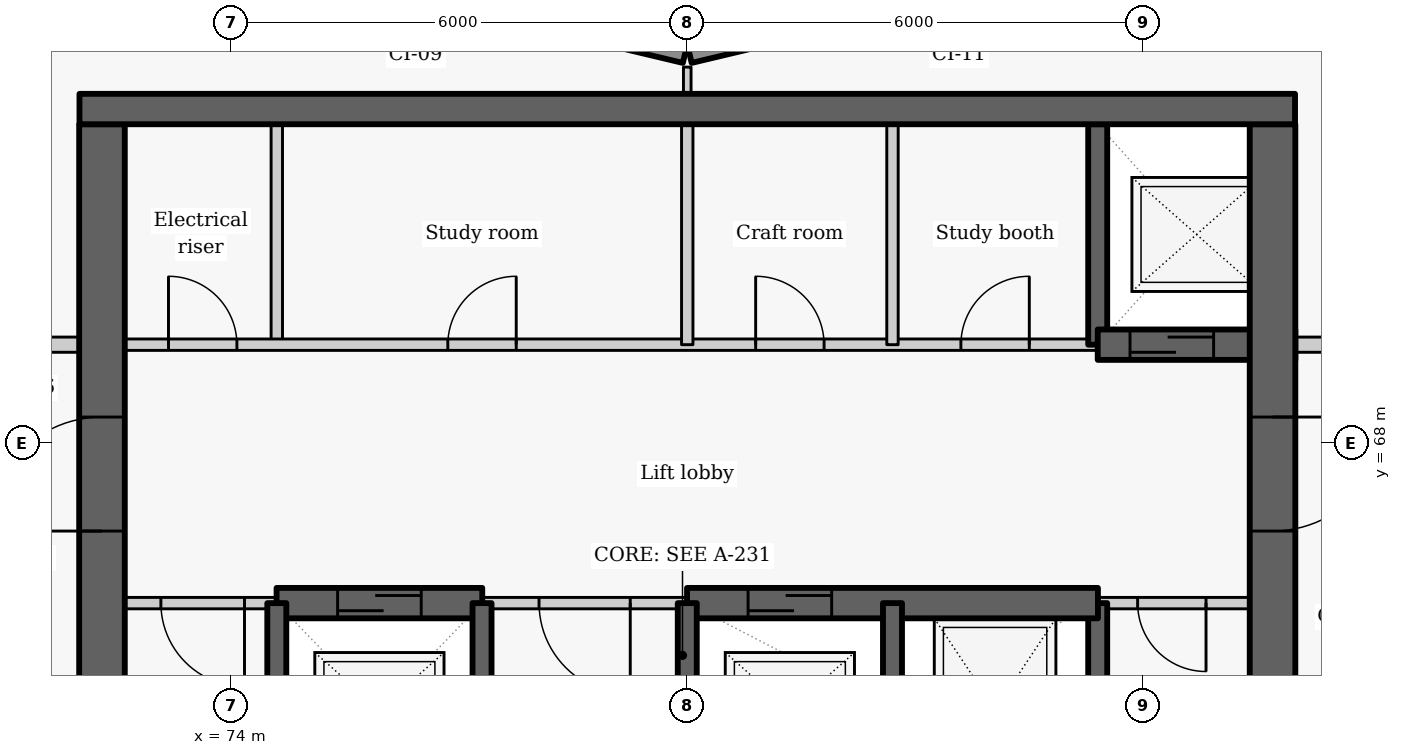
"""IFC4 building model, lengths in metres.
Left out: names, types, materials, properties, quantities, classifications, styles, units other than length and angle.
Written with IfcOpenShell. Run it as: python <this file> out.ifc"""

import sys

from ifc_helpers import new_model, si_unit, direction, frame, frame_2d, origin, place, context, subcontext, project, spatial, rectangle, extrude, element, fill, save


model = new_model("IFC4")
c1 = context("Model", 3, precision=1e-05, world=origin(), true_north=direction((0.0, 1.0)))
c2 = subcontext(c1, "Body", "Model", "MODEL_VIEW")
j1 = project(units=[si_unit("LENGTHUNIT", "METRE"), si_unit("PLANEANGLEUNIT", "RADIAN")], contexts=[c1])
p1 = place(None, origin())
s1 = spatial("IfcSite", under=j1, at=p1, CompositionType="ELEMENT")
p2 = place(p1, origin())
s2 = spatial("IfcBuilding", under=s1, at=p2, CompositionType="ELEMENT")
p3 = place(p2, frame((0.0, 0.0, 176.7)))
s3 = spatial("IfcBuildingStorey", under=s2, at=p3, CompositionType="ELEMENT", Elevation=176.7)
p4 = place(p3, frame((83.186, 73.881, 0.0), z_axis=(0.0, 0.0, 1.0), x_axis=(-0.972773113459, -0.231759508395, 0.0)))
e1 = element("IfcWall", 1, at=p4, inside=s3, PredefinedType="SOLIDWALL", context=c2, shape_type="SweptSolid", body=[
    extrude(rectangle(XDim=3.246, YDim=0.25, at=frame_2d((1.623, 0.0))), origin(), (0.0, 0.0, 1.0), 2.425),
])
p5 = place(p4, frame((0.573, 0.0, 0.9)))
e2 = element("IfcOpeningElement", 2, at=p5, cuts=e1, PredefinedType="OPENING", context=c2, shape_type="SweptSolid", body=[
    extrude(rectangle(XDim=2.1, YDim=1.1, at=frame_2d((1.05, 0.55))), frame((0.0, 0.135, 0.0), z_axis=(0.0, -1.0, 0.0), x_axis=(1.0, 0.0, 0.0)), (0.0, 0.0, 1.0), 0.27),
])
p6 = place(p3, frame((79.971, 73.128, 0.0), z_axis=(0.0, 0.0, 1.0), x_axis=(-0.972773113459, 0.231759508395, 0.0)))
e3 = element("IfcWall", 3, at=p6, inside=s3, PredefinedType="SOLIDWALL", context=c2, shape_type="SweptSolid", body=[
    extrude(rectangle(XDim=3.246, YDim=0.25, at=frame_2d((1.623, 0.0))), origin(), (0.0, 0.0, 1.0), 2.425),
])
p7 = place(p6, frame((0.573, 0.0, 0.9)))
e4 = element("IfcOpeningElement", 4, at=p7, cuts=e3, PredefinedType="OPENING", context=c2, shape_type="SweptSolid", body=[
    extrude(rectangle(XDim=2.1, YDim=1.1, at=frame_2d((1.05, 0.55))), frame((0.0, 0.135, 0.0), z_axis=(0.0, -1.0, 0.0), x_axis=(1.0, 0.0, 0.0)), (0.0, 0.0, 1.0), 0.27),
])
p8 = place(p3, frame((74.6, 69.3, 0.0), z_axis=(0.0, 0.0, 1.0), x_axis=(0.0, 1.0, 0.0)))
e5 = element("IfcWall", 5, at=p8, inside=s3, PredefinedType="PARTITIONING", context=c2, shape_type="SweptSolid", body=[
    extrude(rectangle(XDim=2.9, YDim=0.15, at=frame_2d((1.45, 0.0))), origin(), (0.0, 0.0, 1.0), 3.025),
])
p9 = place(p3, frame((72.0, 69.3, 0.0), z_axis=(0.0, 0.0, 1.0), x_axis=(1.0, 0.0, 0.0)))
e6 = element("IfcWall", 6, at=p9, inside=s3, PredefinedType="PARTITIONING", context=c2, shape_type="SweptSolid", body=[
    extrude(rectangle(XDim=13.4, YDim=0.15, at=frame_2d((6.7, 0.0))), origin(), (0.0, 0.0, 1.0), 3.025),
])
p10 = place(p9, frame((1.175, 0.0, 0.0)))
e7 = element("IfcOpeningElement", 7, at=p10, cuts=e6, PredefinedType="OPENING", context=c2, shape_type="SweptSolid", body=[
    extrude(rectangle(XDim=0.9, YDim=2.1, at=frame_2d((0.45, 1.05))), frame((0.0, 0.085, 0.0), z_axis=(0.0, -1.0, 0.0), x_axis=(1.0, 0.0, 0.0)), (0.0, 0.0, 1.0), 0.17),
])
p11 = place(p9, frame((4.85, 0.0, 0.0)))
e8 = element("IfcOpeningElement", 8, at=p11, cuts=e6, PredefinedType="OPENING", context=c2, shape_type="SweptSolid", body=[
    extrude(rectangle(XDim=0.9, YDim=2.1, at=frame_2d((0.45, 1.05))), frame((0.0, 0.085, 0.0), z_axis=(0.0, -1.0, 0.0), x_axis=(1.0, 0.0, 0.0)), (0.0, 0.0, 1.0), 0.17),
])
p12 = place(p9, frame((8.9, 0.0, 0.0)))
e9 = element("IfcOpeningElement", 9, at=p12, cuts=e6, PredefinedType="OPENING", context=c2, shape_type="SweptSolid", body=[
    extrude(rectangle(XDim=0.9, YDim=2.1, at=frame_2d((0.45, 1.05))), frame((0.0, 0.085, 0.0), z_axis=(0.0, -1.0, 0.0), x_axis=(1.0, 0.0, 0.0)), (0.0, 0.0, 1.0), 0.17),
])
p13 = place(p9, frame((11.6, 0.0, 0.0)))
e10 = element("IfcOpeningElement", 10, at=p13, cuts=e6, PredefinedType="OPENING", context=c2, shape_type="SweptSolid", body=[
    extrude(rectangle(XDim=0.9, YDim=2.1, at=frame_2d((0.45, 1.05))), frame((0.0, 0.085, 0.0), z_axis=(0.0, -1.0, 0.0), x_axis=(1.0, 0.0, 0.0)), (0.0, 0.0, 1.0), 0.17),
])
p14 = place(p3, frame((72.3, 63.1, -0.41), z_axis=(0.0, 0.0, 1.0), x_axis=(0.0, 1.0, 0.0)))
e11 = element("IfcWall", 11, at=p14, inside=s3, PredefinedType="SHEAR", context=c2, shape_type="SweptSolid", body=[
    extrude(rectangle(XDim=9.1, YDim=0.6, at=frame_2d((4.55, 0.0))), origin(), (0.0, 0.0, 1.0), 3.435),
])
p15 = place(p14, frame((3.748, 0.0, 0.41)))
e12 = element("IfcOpeningElement", 12, at=p15, cuts=e11, PredefinedType="OPENING", context=c2, shape_type="SweptSolid", body=[
    extrude(rectangle(XDim=1.5, YDim=2.1, at=frame_2d((0.75, 1.05))), frame((0.0, 0.31, 0.0), z_axis=(0.0, -1.0, 0.0), x_axis=(1.0, 0.0, 0.0)), (0.0, 0.0, 1.0), 0.62),
])
p16 = place(p3, frame((85.4, 63.1, -0.41), z_axis=(0.0, 0.0, 1.0), x_axis=(0.0, 1.0, 0.0)))
e13 = element("IfcWall", 13, at=p16, inside=s3, PredefinedType="SHEAR", context=c2, shape_type="SweptSolid", body=[
    extrude(rectangle(XDim=2.8, YDim=0.25, at=frame_2d((1.4, 0.0))), origin(), (0.0, 0.0, 1.0), 3.435),
])
p17 = place(p3, frame((85.4, 69.3, -0.41), z_axis=(0.0, 0.0, 1.0), x_axis=(0.0, 1.0, 0.0)))
e14 = element("IfcWall", 14, at=p17, inside=s3, PredefinedType="SHEAR", context=c2, shape_type="SweptSolid", body=[
    extrude(rectangle(XDim=2.9, YDim=0.25, at=frame_2d((1.45, 0.0))), origin(), (0.0, 0.0, 1.0), 3.435),
])
p18 = place(p3, frame((85.4, 69.3, -0.41), z_axis=(0.0, 0.0, 1.0), x_axis=(1.0, 0.0, 0.0)))
e15 = element("IfcWall", 15, at=p18, inside=s3, PredefinedType="SHEAR", context=c2, shape_type="SweptSolid", body=[
    extrude(rectangle(XDim=2.6, YDim=0.4, at=frame_2d((1.3, 0.0))), origin(), (0.0, 0.0, 1.0), 3.435),
])
p19 = place(p18, frame((0.425, 0.0, 0.41)))
e16 = element("IfcOpeningElement", 16, at=p19, cuts=e15, PredefinedType="OPENING", context=c2, shape_type="SweptSolid", body=[
    extrude(rectangle(XDim=1.1, YDim=2.1, at=frame_2d((0.55, 1.05))), frame((0.0, 0.21, 0.0), z_axis=(0.0, -1.0, 0.0), x_axis=(1.0, 0.0, 0.0)), (0.0, 0.0, 1.0), 0.42),
])
p20 = place(p3, frame((87.7, 72.2, -0.41), z_axis=(0.0, 0.0, 1.0), x_axis=(0.0, -1.0, 0.0)))
e17 = element("IfcWall", 17, at=p20, inside=s3, PredefinedType="SHEAR", context=c2, shape_type="SweptSolid", body=[
    extrude(rectangle(XDim=14.25, YDim=0.6, at=frame_2d((7.125, 0.0))), origin(), (0.0, 0.0, 1.0), 3.435),
])
p21 = place(p20, frame((3.852, 0.0, 0.41)))
e18 = element("IfcOpeningElement", 18, at=p21, cuts=e17, PredefinedType="OPENING", context=c2, shape_type="SweptSolid", body=[
    extrude(rectangle(XDim=1.5, YDim=2.1, at=frame_2d((0.75, 1.05))), frame((0.0, 0.31, 0.0), z_axis=(0.0, -1.0, 0.0), x_axis=(1.0, 0.0, 0.0)), (0.0, 0.0, 1.0), 0.62),
])
for number, where, z_axis, x_axis in (
    (19, (80.0, 69.3, 0.0), (0.0, 0.0, 1.0), (0.0, 1.0, 0.0)),
    (20, (82.7, 69.3, 0.0), (0.0, 0.0, 1.0), (0.0, 1.0, 0.0)),
):
    element("IfcWall", number, at=place(p3, frame(where, z_axis=z_axis, x_axis=x_axis)), inside=s3, PredefinedType="PARTITIONING", context=c2, shape_type="SweptSolid", body=[
        extrude(rectangle(XDim=2.9, YDim=0.15, at=frame_2d((1.45, 0.0))), origin(), (0.0, 0.0, 1.0), 3.025),
    ])
p22 = place(p3, frame((74.603, 65.9, 0.0), z_axis=(0.0, 0.0, 1.0), x_axis=(-1.0, 0.0, 0.0)))
e21 = element("IfcWall", 21, at=p22, inside=s3, PredefinedType="PARTITIONING", context=c2, shape_type="SweptSolid", body=[
    extrude(rectangle(XDim=2.603, YDim=0.15, at=frame_2d((1.302, 0.0))), origin(), (0.0, 0.0, 1.0), 3.025),
])
p23 = place(p22, frame((0.428, 0.0, 0.0)))
e22 = element("IfcOpeningElement", 22, at=p23, cuts=e21, PredefinedType="OPENING", context=c2, shape_type="SweptSolid", body=[
    extrude(rectangle(XDim=1.1, YDim=2.1, at=frame_2d((0.55, 1.05))), frame((0.0, 0.085, 0.0), z_axis=(0.0, -1.0, 0.0), x_axis=(1.0, 0.0, 0.0)), (0.0, 0.0, 1.0), 0.17),
])
p24 = place(p3, frame((80.003, 65.9, 0.0), z_axis=(0.0, 0.0, 1.0), x_axis=(-1.0, 0.0, 0.0)))
e23 = element("IfcWall", 23, at=p24, inside=s3, PredefinedType="PARTITIONING", context=c2, shape_type="SweptSolid", body=[
    extrude(rectangle(XDim=2.706, YDim=0.15, at=frame_2d((1.353, 0.0))), origin(), (0.0, 0.0, 1.0), 3.025),
])
p25 = place(p24, frame((0.753, 0.0, 0.0)))
e24 = element("IfcOpeningElement", 24, at=p25, cuts=e23, PredefinedType="OPENING", context=c2, shape_type="SweptSolid", body=[
    extrude(rectangle(XDim=1.2, YDim=2.1, at=frame_2d((0.6, 1.05))), frame((0.0, 0.085, 0.0), z_axis=(0.0, -1.0, 0.0), x_axis=(1.0, 0.0, 0.0)), (0.0, 0.0, 1.0), 0.17),
])
p26 = place(p3, frame((88.0, 65.9, 0.0), z_axis=(0.0, 0.0, 1.0), x_axis=(-1.0, 0.0, 0.0)))
e25 = element("IfcWall", 25, at=p26, inside=s3, PredefinedType="PARTITIONING", context=c2, shape_type="SweptSolid", body=[
    extrude(rectangle(XDim=2.603, YDim=0.15, at=frame_2d((1.302, 0.0))), origin(), (0.0, 0.0, 1.0), 3.025),
])
p27 = place(p26, frame((1.175, 0.0, 0.0)))
e26 = element("IfcOpeningElement", 26, at=p27, cuts=e25, PredefinedType="OPENING", context=c2, shape_type="SweptSolid", body=[
    extrude(rectangle(XDim=0.9, YDim=2.1, at=frame_2d((0.45, 1.05))), frame((0.0, 0.085, 0.0), z_axis=(0.0, -1.0, 0.0), x_axis=(1.0, 0.0, 0.0)), (0.0, 0.0, 1.0), 0.17),
])
p28 = place(p3, frame((74.597, 65.9, -0.41), z_axis=(0.0, 0.0, 1.0), x_axis=(1.0, 0.0, 0.0)))
e27 = element("IfcWall", 27, at=p28, inside=s3, PredefinedType="SHEAR", context=c2, shape_type="SweptSolid", body=[
    extrude(rectangle(XDim=2.706, YDim=0.4, at=frame_2d((1.353, 0.0))), origin(), (0.0, 0.0, 1.0), 3.435),
])
p29 = place(p28, frame((0.803, 0.0, 0.41)))
e28 = element("IfcOpeningElement", 28, at=p29, cuts=e27, PredefinedType="OPENING", context=c2, shape_type="SweptSolid", body=[
    extrude(rectangle(XDim=1.1, YDim=2.1, at=frame_2d((0.55, 1.05))), frame((0.0, 0.21, 0.0), z_axis=(0.0, -1.0, 0.0), x_axis=(1.0, 0.0, 0.0)), (0.0, 0.0, 1.0), 0.42),
])
p30 = place(p3, frame((79.997, 65.9, -0.41), z_axis=(0.0, 0.0, 1.0), x_axis=(1.0, 0.0, 0.0)))
e29 = element("IfcWall", 29, at=p30, inside=s3, PredefinedType="SHEAR", context=c2, shape_type="SweptSolid", body=[
    extrude(rectangle(XDim=5.406, YDim=0.4, at=frame_2d((2.703, 0.0))), origin(), (0.0, 0.0, 1.0), 3.435),
])
p31 = place(p30, frame((0.803, 0.0, 0.41)))
e30 = element("IfcOpeningElement", 30, at=p31, cuts=e29, PredefinedType="OPENING", context=c2, shape_type="SweptSolid", body=[
    extrude(rectangle(XDim=1.1, YDim=2.1, at=frame_2d((0.55, 1.05))), frame((0.0, 0.21, 0.0), z_axis=(0.0, -1.0, 0.0), x_axis=(1.0, 0.0, 0.0)), (0.0, 0.0, 1.0), 0.42),
])
for number, where, z_axis, x_axis in (
    (31, (74.6, 63.1, -0.41), (0.0, 0.0, 1.0), (0.0, 1.0, 0.0)),
    (32, (77.3, 63.1, -0.41), (0.0, 0.0, 1.0), (0.0, 1.0, 0.0)),
    (33, (80.0, 63.1, -0.41), (0.0, 0.0, 1.0), (0.0, 1.0, 0.0)),
    (34, (82.7, 63.1, -0.41), (0.0, 0.0, 1.0), (0.0, 1.0, 0.0)),
):
    element("IfcWall", number, at=place(p3, frame(where, z_axis=z_axis, x_axis=x_axis)), inside=s3, PredefinedType="SHEAR", context=c2, shape_type="SweptSolid", body=[
        extrude(rectangle(XDim=2.8, YDim=0.25, at=frame_2d((1.4, 0.0))), origin(), (0.0, 0.0, 1.0), 3.435),
    ])
for number, where, z_axis, x_axis in (
    (35, (70.45, 69.3, 0.0), (0.0, 0.0, 1.0), (1.0, 0.0, 0.0)),
    (36, (88.0, 69.3, 0.0), (0.0, 0.0, 1.0), (1.0, 0.0, 0.0)),
):
    element("IfcWall", number, at=place(p3, frame(where, z_axis=z_axis, x_axis=x_axis)), inside=s3, PredefinedType="PARTITIONING", context=c2, shape_type="SweptSolid", body=[
        extrude(rectangle(XDim=1.55, YDim=0.2, at=frame_2d((0.775, 0.0))), origin(), (0.0, 0.0, 1.0), 3.025),
    ])
p32 = place(p3, frame((80.0, 72.6, 0.0), z_axis=(0.0, 0.0, 1.0), x_axis=(0.0, 1.0, 0.0)))
e37 = element("IfcWall", 37, at=p32, inside=s3, PredefinedType="PARTITIONING", context=c2, shape_type="SweptSolid", body=[
    extrude(rectangle(XDim=0.352, YDim=0.1, at=frame_2d((0.176, 0.0))), origin(), (0.0, 0.0, 1.0), 3.025),
])
p33 = place(p3, frame((72.004, 72.4, -0.41), z_axis=(0.0, 0.0, 1.0), x_axis=(1.0, 0.0, 0.0)))
e38 = element("IfcWall", 38, at=p33, inside=s3, PredefinedType="SHEAR", context=c2, shape_type="SweptSolid", body=[
    extrude(rectangle(XDim=15.992, YDim=0.4, at=frame_2d((7.996, 0.0))), origin(), (0.0, 0.0, 1.0), 3.435),
])
p34 = place(p10, origin())
e39 = element("IfcDoor", 39, at=p34, inside=s3, OperationType="SINGLE_SWING_LEFT", PredefinedType="DOOR", context=c2, shape_type="SweptSolid", body=[
    extrude(rectangle(XDim=0.9, YDim=2.1, at=frame_2d((0.45, 1.05))), frame((0.0, 0.025, 0.0), z_axis=(0.0, -1.0, 0.0), x_axis=(1.0, 0.0, 0.0)), (0.0, 0.0, 1.0), 0.05),
])
fill(e7, e39)
p35 = place(p19, origin())
e40 = element("IfcDoor", 40, at=p35, inside=s3, OperationType="SLIDING_TO_LEFT", PredefinedType="DOOR", context=c2, shape_type="SweptSolid", body=[
    extrude(rectangle(XDim=1.1, YDim=2.1, at=frame_2d((0.55, 1.05))), frame((0.0, 0.025, 0.0), z_axis=(0.0, -1.0, 0.0), x_axis=(1.0, 0.0, 0.0)), (0.0, 0.0, 1.0), 0.05),
])
fill(e16, e40)
p36 = place(p11, origin())
e41 = element("IfcDoor", 41, at=p36, inside=s3, OperationType="SINGLE_SWING_RIGHT", PredefinedType="DOOR", context=c2, shape_type="SweptSolid", body=[
    extrude(rectangle(XDim=0.9, YDim=2.1, at=frame_2d((0.45, 1.05))), frame((0.0, 0.025, 0.0), z_axis=(0.0, -1.0, 0.0), x_axis=(1.0, 0.0, 0.0)), (0.0, 0.0, 1.0), 0.05),
])
fill(e8, e41)
p37 = place(p12, origin())
e42 = element("IfcDoor", 42, at=p37, inside=s3, OperationType="SINGLE_SWING_LEFT", PredefinedType="DOOR", context=c2, shape_type="SweptSolid", body=[
    extrude(rectangle(XDim=0.9, YDim=2.1, at=frame_2d((0.45, 1.05))), frame((0.0, 0.025, 0.0), z_axis=(0.0, -1.0, 0.0), x_axis=(1.0, 0.0, 0.0)), (0.0, 0.0, 1.0), 0.05),
])
fill(e9, e42)
p38 = place(p13, origin())
e43 = element("IfcDoor", 43, at=p38, inside=s3, OperationType="SINGLE_SWING_RIGHT", PredefinedType="DOOR", context=c2, shape_type="SweptSolid", body=[
    extrude(rectangle(XDim=0.9, YDim=2.1, at=frame_2d((0.45, 1.05))), frame((0.0, 0.025, 0.0), z_axis=(0.0, -1.0, 0.0), x_axis=(1.0, 0.0, 0.0)), (0.0, 0.0, 1.0), 0.05),
])
fill(e10, e43)
p39 = place(p23, origin())
e44 = element("IfcDoor", 44, at=p39, inside=s3, OperationType="SINGLE_SWING_LEFT", PredefinedType="DOOR", context=c2, shape_type="SweptSolid", body=[
    extrude(rectangle(XDim=1.1, YDim=2.1, at=frame_2d((0.55, 1.05))), frame((0.0, 0.025, 0.0), z_axis=(0.0, -1.0, 0.0), x_axis=(1.0, 0.0, 0.0)), (0.0, 0.0, 1.0), 0.05),
])
fill(e22, e44)
p40 = place(p29, origin())
e45 = element("IfcDoor", 45, at=p40, inside=s3, OperationType="SLIDING_TO_LEFT", PredefinedType="DOOR", context=c2, shape_type="SweptSolid", body=[
    extrude(rectangle(XDim=1.1, YDim=2.1, at=frame_2d((0.55, 1.05))), frame((0.0, 0.025, 0.0), z_axis=(0.0, -1.0, 0.0), x_axis=(1.0, 0.0, 0.0)), (0.0, 0.0, 1.0), 0.05),
])
fill(e28, e45)
p41 = place(p25, origin())
e46 = element("IfcDoor", 46, at=p41, inside=s3, OperationType="DOUBLE_DOOR_SINGLE_SWING", PredefinedType="DOOR", context=c2, shape_type="SweptSolid", body=[
    extrude(rectangle(XDim=1.2, YDim=2.1, at=frame_2d((0.6, 1.05))), frame((0.0, 0.025, 0.0), z_axis=(0.0, -1.0, 0.0), x_axis=(1.0, 0.0, 0.0)), (0.0, 0.0, 1.0), 0.05),
])
fill(e24, e46)
p42 = place(p31, origin())
e47 = element("IfcDoor", 47, at=p42, inside=s3, OperationType="SLIDING_TO_LEFT", PredefinedType="DOOR", context=c2, shape_type="SweptSolid", body=[
    extrude(rectangle(XDim=1.1, YDim=2.1, at=frame_2d((0.55, 1.05))), frame((0.0, 0.025, 0.0), z_axis=(0.0, -1.0, 0.0), x_axis=(1.0, 0.0, 0.0)), (0.0, 0.0, 1.0), 0.05),
])
fill(e30, e47)
p43 = place(p27, origin())
e48 = element("IfcDoor", 48, at=p43, inside=s3, OperationType="SINGLE_SWING_LEFT", PredefinedType="DOOR", context=c2, shape_type="SweptSolid", body=[
    extrude(rectangle(XDim=0.9, YDim=2.1, at=frame_2d((0.45, 1.05))), frame((0.0, 0.025, 0.0), z_axis=(0.0, -1.0, 0.0), x_axis=(1.0, 0.0, 0.0)), (0.0, 0.0, 1.0), 0.05),
])
fill(e26, e48)
p44 = place(p21, origin())
e49 = element("IfcDoor", 49, at=p44, inside=s3, OperationType="DOUBLE_DOOR_SINGLE_SWING", PredefinedType="DOOR", context=c2, shape_type="SweptSolid", body=[
    extrude(rectangle(XDim=1.5, YDim=2.1, at=frame_2d((0.75, 1.05))), frame((0.0, 0.025, 0.0), z_axis=(0.0, -1.0, 0.0), x_axis=(1.0, 0.0, 0.0)), (0.0, 0.0, 1.0), 0.05),
])
fill(e18, e49)
p45 = place(p15, origin())
e50 = element("IfcDoor", 50, at=p45, inside=s3, OperationType="DOUBLE_DOOR_SINGLE_SWING", PredefinedType="DOOR", context=c2, shape_type="SweptSolid", body=[
    extrude(rectangle(XDim=1.5, YDim=2.1, at=frame_2d((0.75, 1.05))), frame((0.0, 0.025, 0.0), z_axis=(0.0, -1.0, 0.0), x_axis=(1.0, 0.0, 0.0)), (0.0, 0.0, 1.0), 0.05),
])
fill(e12, e50)
save(model, sys.argv[1])
